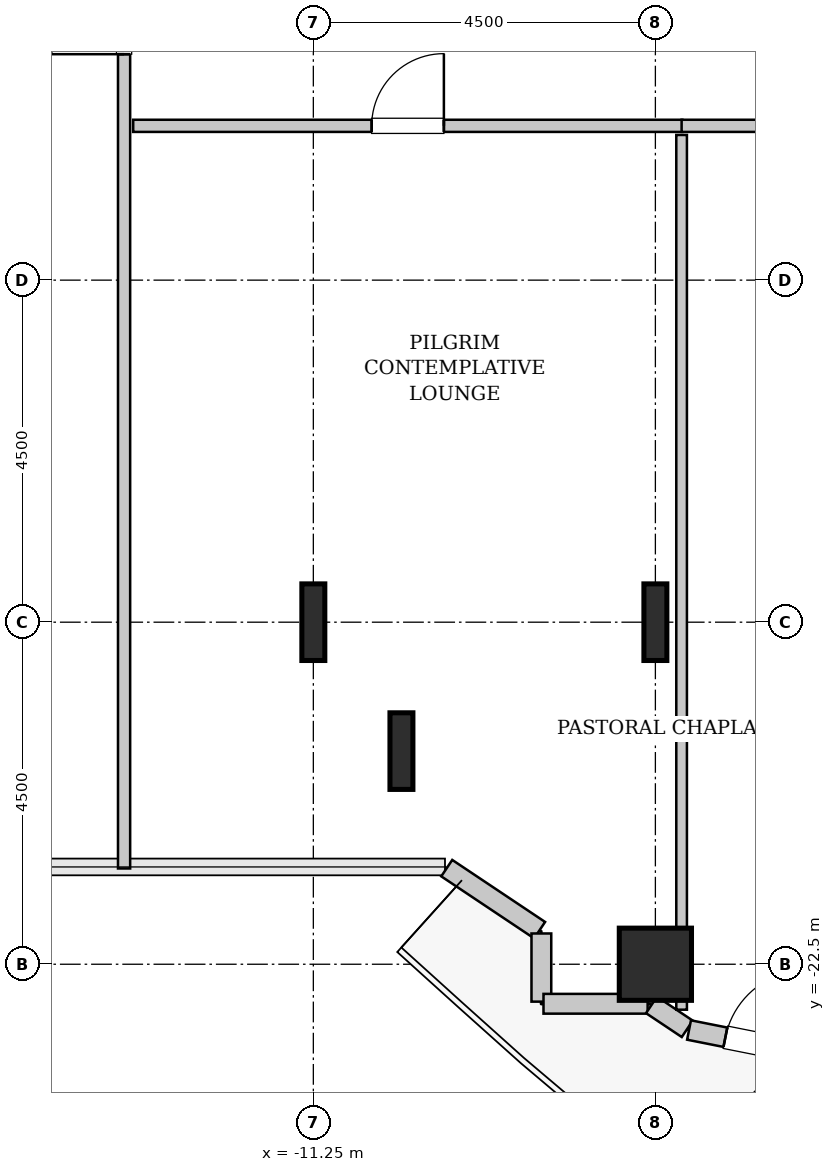
"""IFC4 building model, lengths in metres.
Left out: names, types, materials, properties, quantities, classifications, styles, units other than length and angle.
Written with IfcOpenShell. Run it as: python <this file> out.ifc"""

import sys

from ifc_helpers import new_model, si_unit, direction, frame, frame_2d, origin, origin_2d, place, context, subcontext, project, spatial, rectangle, hollow_rectangle, i_section, extrude, source, transform, mapped, element, fill, save


model = new_model("IFC4")
c1 = context("Model", 3, precision=1e-05, world=origin(), true_north=direction((0.0, 1.0)))
c2 = subcontext(c1, "Body", "Model", "MODEL_VIEW")
j1 = project(units=[si_unit("LENGTHUNIT", "METRE"), si_unit("PLANEANGLEUNIT", "RADIAN")], contexts=[c1])
p1 = place(None, origin())
s1 = spatial("IfcSite", under=j1, at=p1, CompositionType="ELEMENT")
p2 = place(p1, origin())
s2 = spatial("IfcBuilding", under=s1, at=p2, CompositionType="ELEMENT")
p3 = place(p2, frame((0.0, 0.0, 67.2)))
s3 = spatial("IfcBuildingStorey", under=s2, at=p3, CompositionType="ELEMENT", Elevation=67.2)
m1 = source(origin(), c2, "Body", "SweptSolid", [
    extrude(i_section(OverallWidth=0.302, OverallDepth=1.008, WebThickness=0.021, FlangeThickness=0.04, FilletRadius=0.03, at=origin_2d()), origin(), (0.0, 0.0, 1.0), 3.8),
])
for number, where, z_axis, x_axis in (
    (1, (-11.25, -18.0, 0.0), (0.0, 0.0, 1.0), (1.0, 0.0, 0.0)),
    (2, (-10.091, -19.696, 0.0), (0.0, 0.0, 1.0), (1.0, 0.0, 0.0)),
):
    element("IfcColumn", number, at=place(p3, frame(where, z_axis=z_axis, x_axis=x_axis)), inside=s3, PredefinedType="COLUMN", context=c2, shape_type="MappedRepresentation", body=[
        mapped(m1, transform((0.0, 0.0, 0.0), x_axis=(1.0, 0.0, 0.0), y_axis=(0.0, 1.0, 0.0), z_axis=(0.0, 0.0, 1.0), scale=1.0)),
    ])
m2 = source(origin(), c2, "Body", "SweptSolid", [
    extrude(hollow_rectangle(XDim=0.95, YDim=0.95, WallThickness=0.045, InnerFilletRadius=0.045, OuterFilletRadius=0.09, at=origin_2d()), origin(), (0.0, 0.0, 1.0), 3.8),
])
p4 = place(p3, frame((-6.75, -22.5, 0.0), z_axis=(0.0, 0.0, 1.0), x_axis=(1.0, 0.0, 0.0)))
e3 = element("IfcColumn", 3, at=p4, inside=s3, PredefinedType="COLUMN", context=c2, shape_type="MappedRepresentation", body=[
    mapped(m2, transform((0.0, 0.0, 0.0), x_axis=(1.0, 0.0, 0.0), y_axis=(0.0, 1.0, 0.0), z_axis=(0.0, 0.0, 1.0), scale=1.0)),
])
p5 = place(p3, frame((-6.75, -18.0, 0.0), z_axis=(0.0, 0.0, 1.0), x_axis=(1.0, 0.0, 0.0)))
e4 = element("IfcColumn", 4, at=p5, inside=s3, PredefinedType="COLUMN", context=c2, shape_type="MappedRepresentation", body=[
    mapped(m1, transform((0.0, 0.0, 0.0), x_axis=(1.0, 0.0, 0.0), y_axis=(0.0, 1.0, 0.0), z_axis=(0.0, 0.0, 1.0), scale=1.0)),
])
m3 = source(origin(), c2, "Body", "SweptSolid", [
    extrude(rectangle(XDim=1.469, YDim=0.26, at=frame_2d((0.734, 0.0))), origin(), (0.0, 0.0, 1.0), 3.55),
])
p6 = place(p3, frame((-9.495, -21.236, 0.0), z_axis=(0.0, 0.0, 1.0), x_axis=(0.831461760506, -0.555581983884, 0.0)))
e5 = element("IfcWall", 5, at=p6, inside=s3, PredefinedType="SOLIDWALL", context=c2, shape_type="MappedRepresentation", body=[
    mapped(m3, transform((0.0, 0.0, 0.0), x_axis=(1.0, 0.0, 0.0), y_axis=(0.0, 1.0, 0.0), z_axis=(0.0, 0.0, 1.0), scale=1.0)),
])
m4 = source(origin(), c2, "Body", "SweptSolid", [
    extrude(rectangle(XDim=0.897, YDim=0.26, at=frame_2d((0.448, 0.0))), origin(), (0.0, 0.0, 1.0), 3.55),
])
p7 = place(p3, frame((-8.25, -22.095, 0.0), z_axis=(0.0, 0.0, 1.0), x_axis=(0.0, -1.0, 0.0)))
e6 = element("IfcWall", 6, at=p7, inside=s3, PredefinedType="SOLIDWALL", context=c2, shape_type="MappedRepresentation", body=[
    mapped(m4, transform((0.0, 0.0, 0.0), x_axis=(1.0, 0.0, 0.0), y_axis=(0.0, 1.0, 0.0), z_axis=(0.0, 0.0, 1.0), scale=1.0)),
])
m5 = source(origin(), c2, "Body", "SweptSolid", [
    extrude(rectangle(XDim=1.37, YDim=0.26, at=frame_2d((0.685, 0.0))), origin(), (0.0, 0.0, 1.0), 3.55),
])
p8 = place(p3, frame((-8.222, -23.02, 0.0), z_axis=(0.0, 0.0, 1.0), x_axis=(1.0, 0.0, 0.0)))
e7 = element("IfcWall", 7, at=p8, inside=s3, PredefinedType="SOLIDWALL", context=c2, shape_type="MappedRepresentation", body=[
    mapped(m5, transform((0.0, 0.0, 0.0), x_axis=(1.0, 0.0, 0.0), y_axis=(0.0, 1.0, 0.0), z_axis=(0.0, 0.0, 1.0), scale=1.0)),
])
m6 = source(origin(), c2, "Body", "SweptSolid", [
    extrude(rectangle(XDim=0.565, YDim=0.26, at=frame_2d((0.283, 0.0))), origin(), (0.0, 0.0, 1.0), 3.55),
])
p9 = place(p3, frame((-6.801, -23.036, 0.0), z_axis=(0.0, 0.0, 1.0), x_axis=(0.831651492666, -0.555297933317, 0.0)))
e8 = element("IfcWall", 8, at=p9, inside=s3, PredefinedType="SOLIDWALL", context=c2, shape_type="MappedRepresentation", body=[
    mapped(m6, transform((0.0, 0.0, 0.0), x_axis=(1.0, 0.0, 0.0), y_axis=(0.0, 1.0, 0.0), z_axis=(0.0, 0.0, 1.0), scale=1.0)),
])
m7 = source(origin(), c2, "Body", "SweptSolid", [
    extrude(rectangle(XDim=4.137, YDim=0.26, at=frame_2d((2.068, 0.0))), origin(), (0.0, 0.0, 1.0), 3.55),
])
p10 = place(p3, frame((-6.307, -23.365, 0.0), z_axis=(0.0, 0.0, 1.0), x_axis=(0.980782170794, -0.195105954428, 0.0)))
e9 = element("IfcWall", 9, at=p10, inside=s3, PredefinedType="SOLIDWALL", context=c2, shape_type="MappedRepresentation", body=[
    mapped(m7, transform((0.0, 0.0, 0.0), x_axis=(1.0, 0.0, 0.0), y_axis=(0.0, 1.0, 0.0), z_axis=(0.0, 0.0, 1.0), scale=1.0)),
])
p11 = place(p10, frame((0.488, 0.0, 0.0)))
e10 = element("IfcOpeningElement", 10, at=p11, cuts=e9, PredefinedType="OPENING", context=c2, shape_type="SweptSolid", body=[
    extrude(rectangle(XDim=1.1, YDim=2.2, at=frame_2d((0.55, 1.1))), frame((0.0, 0.14, 0.0), z_axis=(0.0, -1.0, 0.0), x_axis=(1.0, 0.0, 0.0)), (0.0, 0.0, 1.0), 0.28),
])
m8 = source(origin(), c2, "Body", "SweptSolid", [
    extrude(rectangle(XDim=12.645, YDim=0.16, at=frame_2d((6.323, 0.0))), origin(), (0.0, 0.0, 1.0), 3.535),
])
p12 = place(p3, frame((-13.74, -21.24, 0.0), z_axis=(0.0, 0.0, 1.0), x_axis=(0.0, 1.0, 0.0)))
e11 = element("IfcWall", 11, at=p12, inside=s3, PredefinedType="PARTITIONING", context=c2, shape_type="MappedRepresentation", body=[
    mapped(m8, transform((0.0, 0.0, 0.0), x_axis=(1.0, 0.0, 0.0), y_axis=(0.0, 1.0, 0.0), z_axis=(0.0, 0.0, 1.0), scale=1.0)),
])
p13 = place(p12, frame((10.712, 0.0, 0.0)))
e12 = element("IfcOpeningElement", 12, at=p13, cuts=e11, PredefinedType="OPENING", context=c2, shape_type="SweptSolid", body=[
    extrude(rectangle(XDim=0.95, YDim=2.1, at=frame_2d((0.475, 1.05))), frame((0.0, 0.09, 0.0), z_axis=(0.0, -1.0, 0.0), x_axis=(1.0, 0.0, 0.0)), (0.0, 0.0, 1.0), 0.18),
])
m9 = source(origin(), c2, "Body", "SweptSolid", [
    extrude(rectangle(XDim=7.225, YDim=0.16, at=frame_2d((3.613, 0.0))), origin(), (0.0, 0.0, 1.0), 3.535),
])
p14 = place(p3, frame((-13.62, -11.47, 0.0), z_axis=(0.0, 0.0, 1.0), x_axis=(1.0, 0.0, 0.0)))
e13 = element("IfcWall", 13, at=p14, inside=s3, PredefinedType="PARTITIONING", context=c2, shape_type="MappedRepresentation", body=[
    mapped(m9, transform((0.0, 0.0, 0.0), x_axis=(1.0, 0.0, 0.0), y_axis=(0.0, 1.0, 0.0), z_axis=(0.0, 0.0, 1.0), scale=1.0)),
])
p15 = place(p14, frame((3.137, 0.0, 0.0)))
e14 = element("IfcOpeningElement", 14, at=p15, cuts=e13, PredefinedType="OPENING", context=c2, shape_type="SweptSolid", body=[
    extrude(rectangle(XDim=0.95, YDim=2.1, at=frame_2d((0.475, 1.05))), frame((0.0, 0.09, 0.0), z_axis=(0.0, -1.0, 0.0), x_axis=(1.0, 0.0, 0.0)), (0.0, 0.0, 1.0), 0.18),
])
m10 = source(origin(), c2, "Body", "SweptSolid", [
    extrude(rectangle(XDim=11.508, YDim=0.14, at=frame_2d((5.754, 0.0))), origin(), (0.0, 0.0, 1.0), 2.825),
])
p16 = place(p3, frame((-6.405, -23.098, 0.0), z_axis=(0.0, 0.0, 1.0), x_axis=(0.0, 1.0, 0.0)))
e15 = element("IfcWall", 15, at=p16, inside=s3, PredefinedType="PARTITIONING", context=c2, shape_type="MappedRepresentation", body=[
    mapped(m10, transform((0.0, 0.0, 0.0), x_axis=(1.0, 0.0, 0.0), y_axis=(0.0, 1.0, 0.0), z_axis=(0.0, 0.0, 1.0), scale=1.0)),
])
m11 = source(origin(), c2, "Body", "SweptSolid", [
    extrude(rectangle(XDim=3.203, YDim=0.16, at=frame_2d((1.601, 0.0))), origin(), (0.0, 0.0, 1.0), 3.535),
])
p17 = place(p3, frame((-6.405, -11.47, 0.0), z_axis=(0.0, 0.0, 1.0), x_axis=(1.0, 0.0, 0.0)))
e16 = element("IfcWall", 16, at=p17, inside=s3, PredefinedType="PARTITIONING", context=c2, shape_type="MappedRepresentation", body=[
    mapped(m11, transform((0.0, 0.0, 0.0), x_axis=(1.0, 0.0, 0.0), y_axis=(0.0, 1.0, 0.0), z_axis=(0.0, 0.0, 1.0), scale=1.0)),
])
p18 = place(p17, frame((1.126, 0.0, 0.0)))
e17 = element("IfcOpeningElement", 17, at=p18, cuts=e16, PredefinedType="OPENING", context=c2, shape_type="SweptSolid", body=[
    extrude(rectangle(XDim=0.95, YDim=2.1, at=frame_2d((0.475, 1.05))), frame((0.0, 0.09, 0.0), z_axis=(0.0, -1.0, 0.0), x_axis=(1.0, 0.0, 0.0)), (0.0, 0.0, 1.0), 0.18),
])
m12 = source(origin(), c2, "Body", "SweptSolid", [
    extrude(rectangle(XDim=1.1, YDim=2.2, at=frame_2d((0.55, 1.1))), frame((0.0, 0.025, 0.0), z_axis=(0.0, -1.0, 0.0), x_axis=(1.0, 0.0, 0.0)), (0.0, 0.0, 1.0), 0.05),
])
p19 = place(p11, origin())
e18 = element("IfcDoor", 18, at=p19, inside=s3, OperationType="SINGLE_SWING_RIGHT", PredefinedType="DOOR", context=c2, shape_type="MappedRepresentation", body=[
    mapped(m12, transform((0.0, 0.0, 0.0), x_axis=(1.0, 0.0, 0.0), y_axis=(0.0, 1.0, 0.0), z_axis=(0.0, 0.0, 1.0), scale=1.0)),
])
fill(e10, e18)
m13 = source(origin(), c2, "Body", "SweptSolid", [
    extrude(rectangle(XDim=0.95, YDim=2.1, at=frame_2d((0.475, 1.05))), frame((0.0, 0.025, 0.0), z_axis=(0.0, -1.0, 0.0), x_axis=(1.0, 0.0, 0.0)), (0.0, 0.0, 1.0), 0.05),
])
p20 = place(p13, origin())
e19 = element("IfcDoor", 19, at=p20, inside=s3, OperationType="SINGLE_SWING_LEFT", PredefinedType="DOOR", context=c2, shape_type="MappedRepresentation", body=[
    mapped(m13, transform((0.0, 0.0, 0.0), x_axis=(1.0, 0.0, 0.0), y_axis=(0.0, 1.0, 0.0), z_axis=(0.0, 0.0, 1.0), scale=1.0)),
])
fill(e12, e19)
p21 = place(p15, origin())
e20 = element("IfcDoor", 20, at=p21, inside=s3, OperationType="SINGLE_SWING_RIGHT", PredefinedType="DOOR", context=c2, shape_type="MappedRepresentation", body=[
    mapped(m13, transform((0.0, 0.0, 0.0), x_axis=(1.0, 0.0, 0.0), y_axis=(0.0, 1.0, 0.0), z_axis=(0.0, 0.0, 1.0), scale=1.0)),
])
fill(e14, e20)
save(model, sys.argv[1])
